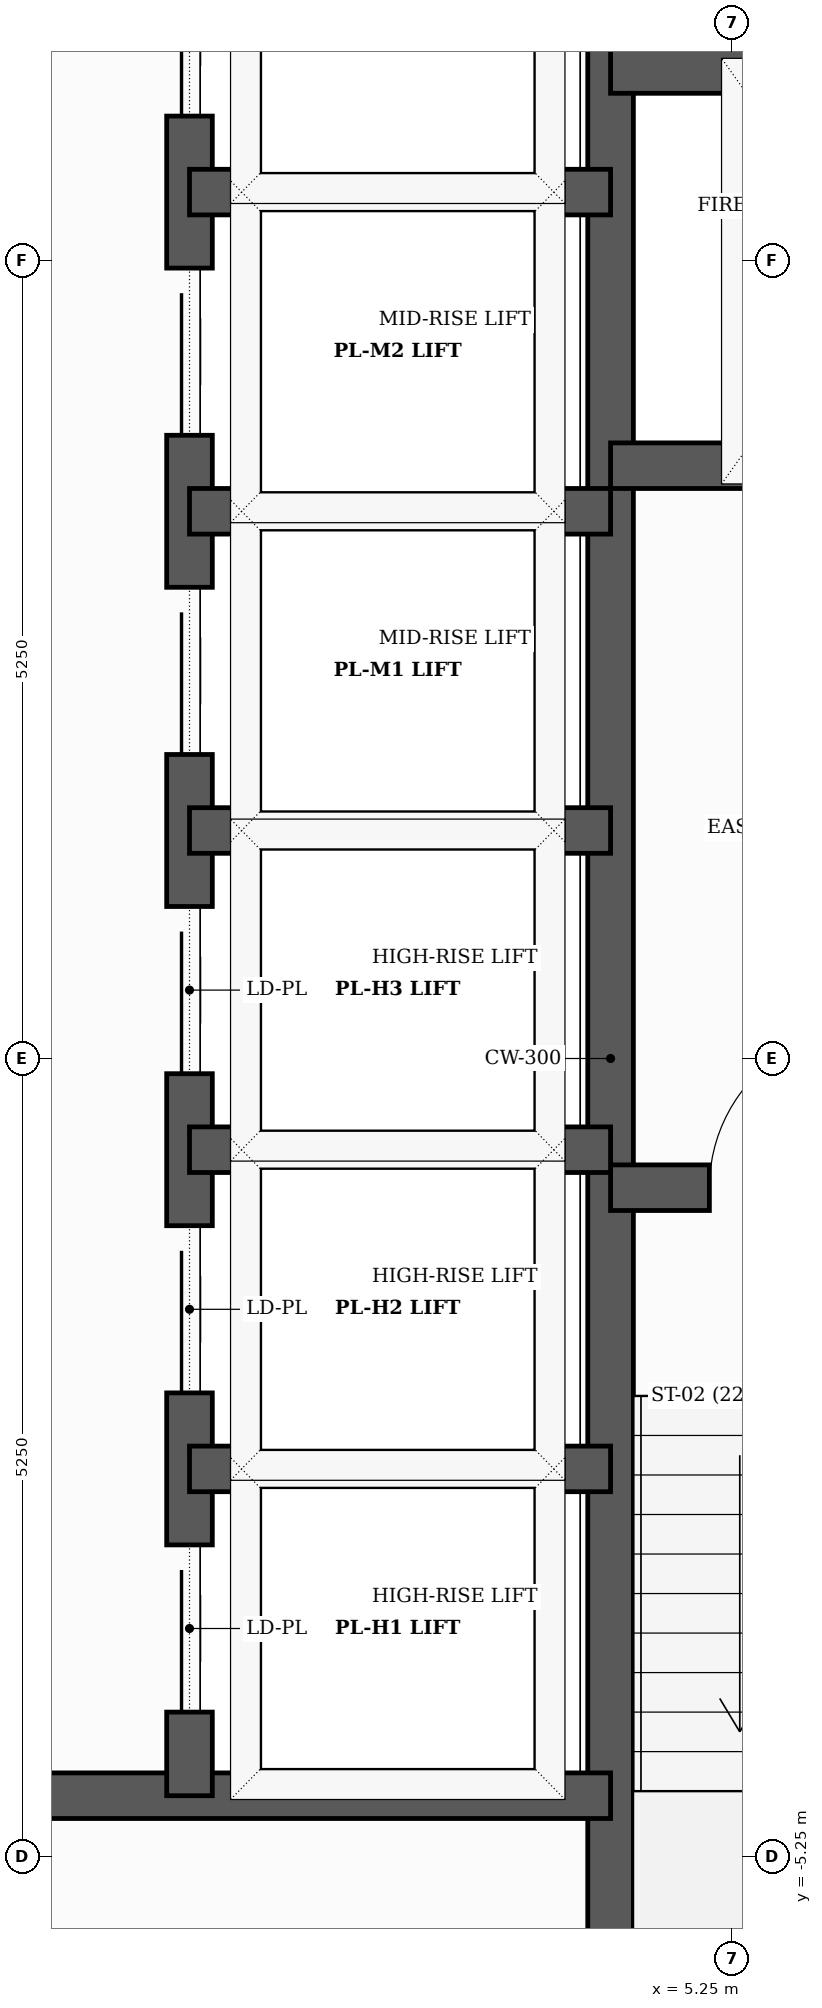
"""IFC4 building model, lengths in metres.
Left out: names, types, materials, properties, quantities, classifications, styles, units other than length and angle.
Written with IfcOpenShell. Run it as: python <this file> out.ifc"""

import sys

from ifc_helpers import new_model, si_unit, direction, frame, frame_2d, origin, place, context, subcontext, project, spatial, rectangle, extrude, element, fill, save


model = new_model("IFC4")
c1 = context("Model", 3, precision=1e-05, world=origin(), true_north=direction((0.0, 1.0)))
c2 = subcontext(c1, "Body", "Model", "MODEL_VIEW")
j1 = project(units=[si_unit("LENGTHUNIT", "METRE"), si_unit("PLANEANGLEUNIT", "RADIAN")], contexts=[c1])
p1 = place(None, origin())
s1 = spatial("IfcSite", under=j1, at=p1, CompositionType="ELEMENT")
p2 = place(p1, origin())
s2 = spatial("IfcBuilding", under=s1, at=p2, CompositionType="ELEMENT")
p3 = place(p2, frame((0.0, 0.0, 184.2)))
s3 = spatial("IfcBuildingStorey", under=s2, at=p3, CompositionType="ELEMENT", Elevation=184.2)
p4 = place(p3, frame((4.45, -7.79, 0.0), z_axis=(0.0, 0.0, 1.0), x_axis=(0.0, 1.0, 0.0)))
e1 = element("IfcWall", 1, at=p4, inside=s3, PredefinedType="SHEAR", context=c2, shape_type="SweptSolid", body=[
    extrude(rectangle(XDim=15.58, YDim=0.3, at=frame_2d((7.79, 0.0))), origin(), (0.0, 0.0, 1.0), 3.5),
])
p5 = place(p3, frame((4.45, -0.85, 0.0), z_axis=(0.0, 0.0, 1.0), x_axis=(1.0, 0.0, 0.0)))
e2 = element("IfcWall", 2, at=p5, inside=s3, PredefinedType="SHEAR", context=c2, shape_type="SweptSolid", body=[
    extrude(rectangle(XDim=3.34, YDim=0.3, at=frame_2d((1.67, 0.0))), origin(), (0.0, 0.0, 1.0), 3.5),
])
p6 = place(p5, frame((0.65, 0.0, 0.0)))
e3 = element("IfcOpeningElement", 3, at=p6, cuts=e2, PredefinedType="OPENING", context=c2, shape_type="SweptSolid", body=[
    extrude(rectangle(XDim=1.05, YDim=2.15, at=frame_2d((0.525, 1.075))), frame((0.0, 0.16, 0.0), z_axis=(0.0, -1.0, 0.0), x_axis=(1.0, 0.0, 0.0)), (0.0, 0.0, 1.0), 0.32),
])
p7 = place(p3, frame((4.45, 3.9, 0.0), z_axis=(0.0, 0.0, 1.0), x_axis=(1.0, 0.0, 0.0)))
e4 = element("IfcWall", 4, at=p7, inside=s3, PredefinedType="SHEAR", context=c2, shape_type="SweptSolid", body=[
    extrude(rectangle(XDim=3.34, YDim=0.3, at=frame_2d((1.67, 0.0))), origin(), (0.0, 0.0, 1.0), 3.5),
])
p8 = place(p7, frame((1.18, 0.0, 0.0)))
e5 = element("IfcOpeningElement", 5, at=p8, cuts=e4, PredefinedType="OPENING", context=c2, shape_type="SweptSolid", body=[
    extrude(rectangle(XDim=1.1, YDim=2.1, at=frame_2d((0.55, 1.05))), frame((0.0, 0.16, 0.0), z_axis=(0.0, -1.0, 0.0), x_axis=(1.0, 0.0, 0.0)), (0.0, 0.0, 1.0), 0.32),
])
p9 = place(p3, frame((4.45, 6.5, 0.0), z_axis=(0.0, 0.0, 1.0), x_axis=(1.0, 0.0, 0.0)))
e6 = element("IfcWall", 6, at=p9, inside=s3, PredefinedType="SHEAR", context=c2, shape_type="SweptSolid", body=[
    extrude(rectangle(XDim=3.34, YDim=0.3, at=frame_2d((1.67, 0.0))), origin(), (0.0, 0.0, 1.0), 3.5),
])
p10 = place(p3, frame((-4.45, -4.85, 0.0), z_axis=(0.0, 0.0, 1.0), x_axis=(1.0, 0.0, 0.0)))
e7 = element("IfcWall", 7, at=p10, inside=s3, PredefinedType="SHEAR", context=c2, shape_type="SweptSolid", body=[
    extrude(rectangle(XDim=8.9, YDim=0.3, at=frame_2d((4.45, 0.0))), origin(), (0.0, 0.0, 1.0), 3.5),
])
p11 = place(p3, frame((1.68, -4.85, 0.0), z_axis=(0.0, 0.0, 1.0), x_axis=(0.0, 1.0, 0.0)))
e8 = element("IfcWall", 8, at=p11, inside=s3, PredefinedType="SHEAR", context=c2, shape_type="SweptSolid", body=[
    extrude(rectangle(XDim=12.64, YDim=0.3, at=frame_2d((6.32, 0.0))), origin(), (0.0, 0.0, 1.0), 3.5),
])
p12 = place(p11, frame((0.55, 0.0, 0.0)))
e9 = element("IfcOpeningElement", 9, at=p12, cuts=e8, PredefinedType="OPENING", context=c2, shape_type="SweptSolid", body=[
    extrude(rectangle(XDim=1.1, YDim=2.1, at=frame_2d((0.55, 1.05))), frame((0.0, 0.16, 0.0), z_axis=(0.0, -1.0, 0.0), x_axis=(1.0, 0.0, 0.0)), (0.0, 0.0, 1.0), 0.32),
])
p13 = place(p11, frame((2.65, 0.0, 0.0)))
e10 = element("IfcOpeningElement", 10, at=p13, cuts=e8, PredefinedType="OPENING", context=c2, shape_type="SweptSolid", body=[
    extrude(rectangle(XDim=1.1, YDim=2.1, at=frame_2d((0.55, 1.05))), frame((0.0, 0.16, 0.0), z_axis=(0.0, -1.0, 0.0), x_axis=(1.0, 0.0, 0.0)), (0.0, 0.0, 1.0), 0.32),
])
p14 = place(p11, frame((4.75, 0.0, 0.0)))
e11 = element("IfcOpeningElement", 11, at=p14, cuts=e8, PredefinedType="OPENING", context=c2, shape_type="SweptSolid", body=[
    extrude(rectangle(XDim=1.1, YDim=2.1, at=frame_2d((0.55, 1.05))), frame((0.0, 0.16, 0.0), z_axis=(0.0, -1.0, 0.0), x_axis=(1.0, 0.0, 0.0)), (0.0, 0.0, 1.0), 0.32),
])
p15 = place(p11, frame((6.85, 0.0, 0.0)))
e12 = element("IfcOpeningElement", 12, at=p15, cuts=e8, PredefinedType="OPENING", context=c2, shape_type="SweptSolid", body=[
    extrude(rectangle(XDim=1.1, YDim=2.1, at=frame_2d((0.55, 1.05))), frame((0.0, 0.16, 0.0), z_axis=(0.0, -1.0, 0.0), x_axis=(1.0, 0.0, 0.0)), (0.0, 0.0, 1.0), 0.32),
])
p16 = place(p11, frame((8.95, 0.0, 0.0)))
e13 = element("IfcOpeningElement", 13, at=p16, cuts=e8, PredefinedType="OPENING", context=c2, shape_type="SweptSolid", body=[
    extrude(rectangle(XDim=1.1, YDim=2.1, at=frame_2d((0.55, 1.05))), frame((0.0, 0.16, 0.0), z_axis=(0.0, -1.0, 0.0), x_axis=(1.0, 0.0, 0.0)), (0.0, 0.0, 1.0), 0.32),
])
p17 = place(p11, frame((11.05, 0.0, 0.0)))
e14 = element("IfcOpeningElement", 14, at=p17, cuts=e8, PredefinedType="OPENING", context=c2, shape_type="SweptSolid", body=[
    extrude(rectangle(XDim=1.1, YDim=2.1, at=frame_2d((0.55, 1.05))), frame((0.0, 0.16, 0.0), z_axis=(0.0, -1.0, 0.0), x_axis=(1.0, 0.0, 0.0)), (0.0, 0.0, 1.0), 0.32),
])
for number, where, z_axis, x_axis in (
    (15, (1.68, 1.5, 0.0), (0.0, 0.0, 1.0), (1.0, 0.0, 0.0)),
    (16, (1.68, 3.6, 0.0), (0.0, 0.0, 1.0), (1.0, 0.0, 0.0)),
    (17, (1.68, 5.7, 0.0), (0.0, 0.0, 1.0), (1.0, 0.0, 0.0)),
    (18, (1.68, -2.7, 0.0), (0.0, 0.0, 1.0), (1.0, 0.0, 0.0)),
    (19, (1.68, -0.6, 0.0), (0.0, 0.0, 1.0), (1.0, 0.0, 0.0)),
):
    element("IfcWall", number, at=place(p3, frame(where, z_axis=z_axis, x_axis=x_axis)), inside=s3, PredefinedType="SHEAR", context=c2, shape_type="SweptSolid", body=[
        extrude(rectangle(XDim=2.77, YDim=0.3, at=frame_2d((1.385, 0.0))), origin(), (0.0, 0.0, 1.0), 3.5),
    ])
p18 = place(p6, origin())
e20 = element("IfcDoor", 20, at=p18, inside=s3, OperationType="SINGLE_SWING_RIGHT", PredefinedType="DOOR", context=c2, shape_type="SweptSolid", body=[
    extrude(rectangle(XDim=1.05, YDim=2.15, at=frame_2d((0.525, 1.075))), frame((0.0, 0.025, 0.0), z_axis=(0.0, -1.0, 0.0), x_axis=(1.0, 0.0, 0.0)), (0.0, 0.0, 1.0), 0.05),
])
fill(e3, e20)
p19 = place(p12, origin())
e21 = element("IfcDoor", 21, at=p19, inside=s3, OperationType="SLIDING_TO_LEFT", PredefinedType="DOOR", context=c2, shape_type="SweptSolid", body=[
    extrude(rectangle(XDim=1.1, YDim=2.1, at=frame_2d((0.55, 1.05))), frame((0.0, 0.025, 0.0), z_axis=(0.0, -1.0, 0.0), x_axis=(1.0, 0.0, 0.0)), (0.0, 0.0, 1.0), 0.05),
])
fill(e9, e21)
p20 = place(p13, origin())
e22 = element("IfcDoor", 22, at=p20, inside=s3, OperationType="SLIDING_TO_LEFT", PredefinedType="DOOR", context=c2, shape_type="SweptSolid", body=[
    extrude(rectangle(XDim=1.1, YDim=2.1, at=frame_2d((0.55, 1.05))), frame((0.0, 0.025, 0.0), z_axis=(0.0, -1.0, 0.0), x_axis=(1.0, 0.0, 0.0)), (0.0, 0.0, 1.0), 0.05),
])
fill(e10, e22)
p21 = place(p14, origin())
e23 = element("IfcDoor", 23, at=p21, inside=s3, OperationType="SLIDING_TO_LEFT", PredefinedType="DOOR", context=c2, shape_type="SweptSolid", body=[
    extrude(rectangle(XDim=1.1, YDim=2.1, at=frame_2d((0.55, 1.05))), frame((0.0, 0.025, 0.0), z_axis=(0.0, -1.0, 0.0), x_axis=(1.0, 0.0, 0.0)), (0.0, 0.0, 1.0), 0.05),
])
fill(e11, e23)
p22 = place(p15, origin())
e24 = element("IfcDoor", 24, at=p22, inside=s3, OperationType="SLIDING_TO_LEFT", PredefinedType="DOOR", context=c2, shape_type="SweptSolid", body=[
    extrude(rectangle(XDim=1.1, YDim=2.1, at=frame_2d((0.55, 1.05))), frame((0.0, 0.025, 0.0), z_axis=(0.0, -1.0, 0.0), x_axis=(1.0, 0.0, 0.0)), (0.0, 0.0, 1.0), 0.05),
])
fill(e12, e24)
p23 = place(p16, origin())
e25 = element("IfcDoor", 25, at=p23, inside=s3, OperationType="SLIDING_TO_LEFT", PredefinedType="DOOR", context=c2, shape_type="SweptSolid", body=[
    extrude(rectangle(XDim=1.1, YDim=2.1, at=frame_2d((0.55, 1.05))), frame((0.0, 0.025, 0.0), z_axis=(0.0, -1.0, 0.0), x_axis=(1.0, 0.0, 0.0)), (0.0, 0.0, 1.0), 0.05),
])
fill(e13, e25)
p24 = place(p17, origin())
e26 = element("IfcDoor", 26, at=p24, inside=s3, OperationType="SLIDING_TO_LEFT", PredefinedType="DOOR", context=c2, shape_type="SweptSolid", body=[
    extrude(rectangle(XDim=1.1, YDim=2.1, at=frame_2d((0.55, 1.05))), frame((0.0, 0.025, 0.0), z_axis=(0.0, -1.0, 0.0), x_axis=(1.0, 0.0, 0.0)), (0.0, 0.0, 1.0), 0.05),
])
fill(e14, e26)
save(model, sys.argv[1])
